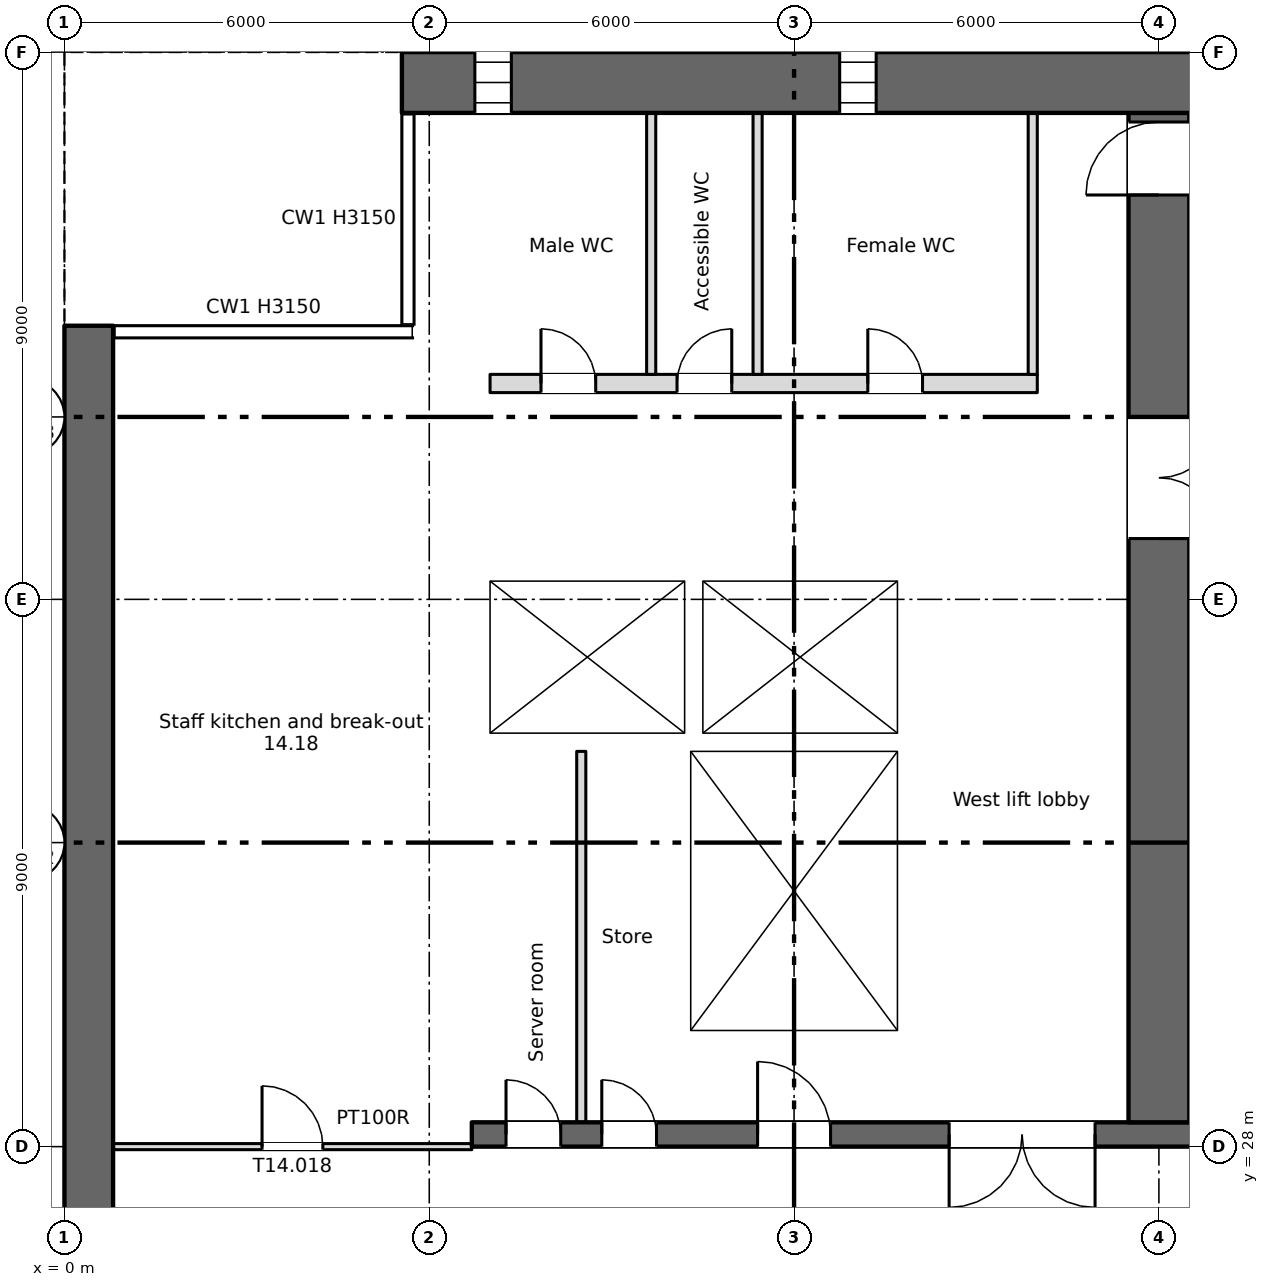
"""IFC4 building model, lengths in metres.
Left out: names, types, materials, properties, quantities, classifications, styles, units other than length and angle.
Written with IfcOpenShell. Run it as: python <this file> out.ifc"""

import sys

from ifc_helpers import new_model, si_unit, direction, frame, frame_2d, origin, place, context, subcontext, project, spatial, rectangle, extrude, element, fill, save


model = new_model("IFC4")
c1 = context("Model", 3, precision=1e-05, world=origin(), true_north=direction((0.0, 1.0)))
c2 = subcontext(c1, "Body", "Model", "MODEL_VIEW")
j1 = project(units=[si_unit("LENGTHUNIT", "METRE"), si_unit("PLANEANGLEUNIT", "RADIAN")], contexts=[c1])
p1 = place(None, origin())
s1 = spatial("IfcSite", under=j1, at=p1, CompositionType="ELEMENT")
p2 = place(p1, origin())
s2 = spatial("IfcBuilding", under=s1, at=p2, CompositionType="ELEMENT")
p3 = place(p2, frame((0.0, 0.0, 86.25)))
s3 = spatial("IfcBuildingStorey", under=s2, at=p3, CompositionType="ELEMENT", Elevation=86.25)
p4 = place(p3, frame((0.4, 4.5, 0.0), z_axis=(0.0, 0.0, 1.0), x_axis=(0.0, 1.0, 0.0)))
e1 = element("IfcWall", 1, at=p4, inside=s3, PredefinedType="SHEAR", context=c2, shape_type="SweptSolid", body=[
    extrude(rectangle(XDim=37.0, YDim=0.8, at=frame_2d((18.5, 0.0))), origin(), (0.0, 0.0, 1.0), 3.15),
])
p5 = place(p4, frame((1.2, 0.0, 0.6)))
e2 = element("IfcOpeningElement", 2, at=p5, cuts=e1, PredefinedType="OPENING", context=c2, shape_type="SweptSolid", body=[
    extrude(rectangle(XDim=0.6, YDim=2.4, at=frame_2d((0.3, 1.2))), frame((0.0, 0.41, 0.0), z_axis=(0.0, -1.0, 0.0), x_axis=(1.0, 0.0, 0.0)), (0.0, 0.0, 1.0), 0.82),
])
p6 = place(p4, frame((7.2, 0.0, 0.6)))
e3 = element("IfcOpeningElement", 3, at=p6, cuts=e1, PredefinedType="OPENING", context=c2, shape_type="SweptSolid", body=[
    extrude(rectangle(XDim=0.6, YDim=2.4, at=frame_2d((0.3, 1.2))), frame((0.0, 0.41, 0.0), z_axis=(0.0, -1.0, 0.0), x_axis=(1.0, 0.0, 0.0)), (0.0, 0.0, 1.0), 0.82),
])
p7 = place(p4, frame((13.2, 0.0, 0.6)))
e4 = element("IfcOpeningElement", 4, at=p7, cuts=e1, PredefinedType="OPENING", context=c2, shape_type="SweptSolid", body=[
    extrude(rectangle(XDim=0.6, YDim=2.4, at=frame_2d((0.3, 1.2))), frame((0.0, 0.41, 0.0), z_axis=(0.0, -1.0, 0.0), x_axis=(1.0, 0.0, 0.0)), (0.0, 0.0, 1.0), 0.82),
])
p8 = place(p4, frame((19.2, 0.0, 0.6)))
e5 = element("IfcOpeningElement", 5, at=p8, cuts=e1, PredefinedType="OPENING", context=c2, shape_type="SweptSolid", body=[
    extrude(rectangle(XDim=0.6, YDim=2.4, at=frame_2d((0.3, 1.2))), frame((0.0, 0.41, 0.0), z_axis=(0.0, -1.0, 0.0), x_axis=(1.0, 0.0, 0.0)), (0.0, 0.0, 1.0), 0.82),
])
p9 = place(p3, frame((5.55, 45.5, 0.0), z_axis=(0.0, 0.0, 1.0), x_axis=(1.0, 0.0, 0.0)))
e6 = element("IfcWall", 6, at=p9, inside=s3, PredefinedType="SHEAR", context=c2, shape_type="SweptSolid", body=[
    extrude(rectangle(XDim=66.9, YDim=1.0, at=frame_2d((33.45, 0.0))), origin(), (0.0, 0.0, 1.0), 3.15),
])
p10 = place(p9, frame((1.2, 0.0, 0.6)))
e7 = element("IfcOpeningElement", 7, at=p10, cuts=e6, PredefinedType="OPENING", context=c2, shape_type="SweptSolid", body=[
    extrude(rectangle(XDim=0.6, YDim=2.4, at=frame_2d((0.3, 1.2))), frame((0.0, 0.51, 0.0), z_axis=(0.0, -1.0, 0.0), x_axis=(1.0, 0.0, 0.0)), (0.0, 0.0, 1.0), 1.02),
])
p11 = place(p9, frame((7.2, 0.0, 0.6)))
e8 = element("IfcOpeningElement", 8, at=p11, cuts=e6, PredefinedType="OPENING", context=c2, shape_type="SweptSolid", body=[
    extrude(rectangle(XDim=0.6, YDim=2.4, at=frame_2d((0.3, 1.2))), frame((0.0, 0.51, 0.0), z_axis=(0.0, -1.0, 0.0), x_axis=(1.0, 0.0, 0.0)), (0.0, 0.0, 1.0), 1.02),
])
p12 = place(p9, frame((55.2, 0.0, 0.6)))
e9 = element("IfcOpeningElement", 9, at=p12, cuts=e6, PredefinedType="OPENING", context=c2, shape_type="SweptSolid", body=[
    extrude(rectangle(XDim=0.6, YDim=2.4, at=frame_2d((0.3, 1.2))), frame((0.0, 0.51, 0.0), z_axis=(0.0, -1.0, 0.0), x_axis=(1.0, 0.0, 0.0)), (0.0, 0.0, 1.0), 1.02),
])
p13 = place(p9, frame((61.2, 0.0, 0.6)))
e10 = element("IfcOpeningElement", 10, at=p13, cuts=e6, PredefinedType="OPENING", context=c2, shape_type="SweptSolid", body=[
    extrude(rectangle(XDim=0.6, YDim=2.4, at=frame_2d((0.3, 1.2))), frame((0.0, 0.51, 0.0), z_axis=(0.0, -1.0, 0.0), x_axis=(1.0, 0.0, 0.0)), (0.0, 0.0, 1.0), 1.02),
])
p14 = place(p3, frame((6.7, 28.2, 0.0), z_axis=(0.0, 0.0, 1.0), x_axis=(1.0, 0.0, 0.0)))
e11 = element("IfcWall", 11, at=p14, inside=s3, PredefinedType="SHEAR", context=c2, shape_type="SweptSolid", body=[
    extrude(rectangle(XDim=57.8, YDim=0.4, at=frame_2d((28.9, 0.0))), origin(), (0.0, 0.0, 1.0), 3.15),
])
p15 = place(p14, frame((12.812, 0.0, 0.0)))
e12 = element("IfcOpeningElement", 12, at=p15, cuts=e11, PredefinedType="OPENING", context=c2, shape_type="SweptSolid", body=[
    extrude(rectangle(XDim=0.9, YDim=2.1, at=frame_2d((0.45, 1.05))), frame((0.0, 0.21, 0.0), z_axis=(0.0, -1.0, 0.0), x_axis=(1.0, 0.0, 0.0)), (0.0, 0.0, 1.0), 0.42),
])
p16 = place(p14, frame((15.387, 0.0, 0.0)))
e13 = element("IfcOpeningElement", 13, at=p16, cuts=e11, PredefinedType="OPENING", context=c2, shape_type="SweptSolid", body=[
    extrude(rectangle(XDim=0.9, YDim=2.1, at=frame_2d((0.45, 1.05))), frame((0.0, 0.21, 0.0), z_axis=(0.0, -1.0, 0.0), x_axis=(1.0, 0.0, 0.0)), (0.0, 0.0, 1.0), 0.42),
])
p17 = place(p14, frame((48.312, 0.0, 0.0)))
e14 = element("IfcOpeningElement", 14, at=p17, cuts=e11, PredefinedType="OPENING", context=c2, shape_type="SweptSolid", body=[
    extrude(rectangle(XDim=0.9, YDim=2.1, at=frame_2d((0.45, 1.05))), frame((0.0, 0.21, 0.0), z_axis=(0.0, -1.0, 0.0), x_axis=(1.0, 0.0, 0.0)), (0.0, 0.0, 1.0), 0.42),
])
p18 = place(p14, frame((50.887, 0.0, 0.0)))
e15 = element("IfcOpeningElement", 15, at=p18, cuts=e11, PredefinedType="OPENING", context=c2, shape_type="SweptSolid", body=[
    extrude(rectangle(XDim=0.9, YDim=2.1, at=frame_2d((0.45, 1.05))), frame((0.0, 0.21, 0.0), z_axis=(0.0, -1.0, 0.0), x_axis=(1.0, 0.0, 0.0)), (0.0, 0.0, 1.0), 0.42),
])
p19 = place(p14, frame((0.562, 0.0, 0.0)))
e16 = element("IfcOpeningElement", 16, at=p19, cuts=e11, PredefinedType="OPENING", context=c2, shape_type="SweptSolid", body=[
    extrude(rectangle(XDim=0.9, YDim=2.1, at=frame_2d((0.45, 1.05))), frame((0.0, 0.21, 0.0), z_axis=(0.0, -1.0, 0.0), x_axis=(1.0, 0.0, 0.0)), (0.0, 0.0, 1.0), 0.42),
])
p20 = place(p14, frame((2.137, 0.0, 0.0)))
e17 = element("IfcOpeningElement", 17, at=p20, cuts=e11, PredefinedType="OPENING", context=c2, shape_type="SweptSolid", body=[
    extrude(rectangle(XDim=0.9, YDim=2.1, at=frame_2d((0.45, 1.05))), frame((0.0, 0.21, 0.0), z_axis=(0.0, -1.0, 0.0), x_axis=(1.0, 0.0, 0.0)), (0.0, 0.0, 1.0), 0.42),
])
p21 = place(p14, frame((4.7, 0.0, 0.0)))
e18 = element("IfcOpeningElement", 18, at=p21, cuts=e11, PredefinedType="OPENING", context=c2, shape_type="SweptSolid", body=[
    extrude(rectangle(XDim=1.2, YDim=2.1, at=frame_2d((0.6, 1.05))), frame((0.0, 0.21, 0.0), z_axis=(0.0, -1.0, 0.0), x_axis=(1.0, 0.0, 0.0)), (0.0, 0.0, 1.0), 0.42),
])
p22 = place(p14, frame((31.7, 0.0, 0.0)))
e19 = element("IfcOpeningElement", 19, at=p22, cuts=e11, PredefinedType="OPENING", context=c2, shape_type="SweptSolid", body=[
    extrude(rectangle(XDim=1.2, YDim=2.1, at=frame_2d((0.6, 1.05))), frame((0.0, 0.21, 0.0), z_axis=(0.0, -1.0, 0.0), x_axis=(1.0, 0.0, 0.0)), (0.0, 0.0, 1.0), 0.42),
])
p23 = place(p14, frame((55.2, 0.0, 0.0)))
e20 = element("IfcOpeningElement", 20, at=p23, cuts=e11, PredefinedType="OPENING", context=c2, shape_type="SweptSolid", body=[
    extrude(rectangle(XDim=1.2, YDim=2.1, at=frame_2d((0.6, 1.05))), frame((0.0, 0.21, 0.0), z_axis=(0.0, -1.0, 0.0), x_axis=(1.0, 0.0, 0.0)), (0.0, 0.0, 1.0), 0.42),
])
p24 = place(p14, frame((21.7, 0.0, 0.0)))
e21 = element("IfcOpeningElement", 21, at=p24, cuts=e11, PredefinedType="OPENING", context=c2, shape_type="SweptSolid", body=[
    extrude(rectangle(XDim=1.2, YDim=2.1, at=frame_2d((0.6, 1.05))), frame((0.0, 0.21, 0.0), z_axis=(0.0, -1.0, 0.0), x_axis=(1.0, 0.0, 0.0)), (0.0, 0.0, 1.0), 0.42),
])
p25 = place(p14, frame((41.7, 0.0, 0.0)))
e22 = element("IfcOpeningElement", 22, at=p25, cuts=e11, PredefinedType="OPENING", context=c2, shape_type="SweptSolid", body=[
    extrude(rectangle(XDim=1.2, YDim=2.1, at=frame_2d((0.6, 1.05))), frame((0.0, 0.21, 0.0), z_axis=(0.0, -1.0, 0.0), x_axis=(1.0, 0.0, 0.0)), (0.0, 0.0, 1.0), 0.42),
])
p26 = place(p14, frame((24.85, 0.0, 0.0)))
e23 = element("IfcOpeningElement", 23, at=p26, cuts=e11, PredefinedType="OPENING", context=c2, shape_type="SweptSolid", body=[
    extrude(rectangle(XDim=2.4, YDim=2.1, at=frame_2d((1.2, 1.05))), frame((0.0, 0.21, 0.0), z_axis=(0.0, -1.0, 0.0), x_axis=(1.0, 0.0, 0.0)), (0.0, 0.0, 1.0), 0.42),
])
p27 = place(p14, frame((37.35, 0.0, 0.0)))
e24 = element("IfcOpeningElement", 24, at=p27, cuts=e11, PredefinedType="OPENING", context=c2, shape_type="SweptSolid", body=[
    extrude(rectangle(XDim=2.4, YDim=2.1, at=frame_2d((1.2, 1.05))), frame((0.0, 0.21, 0.0), z_axis=(0.0, -1.0, 0.0), x_axis=(1.0, 0.0, 0.0)), (0.0, 0.0, 1.0), 0.42),
])
p28 = place(p14, frame((7.85, 0.0, 0.0)))
e25 = element("IfcOpeningElement", 25, at=p28, cuts=e11, PredefinedType="OPENING", context=c2, shape_type="SweptSolid", body=[
    extrude(rectangle(XDim=2.4, YDim=2.1, at=frame_2d((1.2, 1.05))), frame((0.0, 0.21, 0.0), z_axis=(0.0, -1.0, 0.0), x_axis=(1.0, 0.0, 0.0)), (0.0, 0.0, 1.0), 0.42),
])
p29 = place(p14, frame((28.85, 0.0, 0.0)))
e26 = element("IfcOpeningElement", 26, at=p29, cuts=e11, PredefinedType="OPENING", context=c2, shape_type="SweptSolid", body=[
    extrude(rectangle(XDim=0.9, YDim=2.1, at=frame_2d((0.45, 1.05))), frame((0.0, 0.21, 0.0), z_axis=(0.0, -1.0, 0.0), x_axis=(1.0, 0.0, 0.0)), (0.0, 0.0, 1.0), 0.42),
])
p30 = place(p14, frame((34.85, 0.0, 0.0)))
e27 = element("IfcOpeningElement", 27, at=p30, cuts=e11, PredefinedType="OPENING", context=c2, shape_type="SweptSolid", body=[
    extrude(rectangle(XDim=0.9, YDim=2.1, at=frame_2d((0.45, 1.05))), frame((0.0, 0.21, 0.0), z_axis=(0.0, -1.0, 0.0), x_axis=(1.0, 0.0, 0.0)), (0.0, 0.0, 1.0), 0.42),
])
p31 = place(p3, frame((6.85, 28.4, 0.0), z_axis=(0.0, 0.0, 1.0), x_axis=(0.0, 1.0, 0.0)))
e28 = element("IfcWall", 28, at=p31, inside=s3, PredefinedType="SHEAR", context=c2, shape_type="SweptSolid", body=[
    extrude(rectangle(XDim=16.6, YDim=0.3, at=frame_2d((8.3, 0.0))), origin(), (0.0, 0.0, 1.0), 3.15),
])
p32 = place(p3, frame((18.0, 28.4, 0.0), z_axis=(0.0, 0.0, 1.0), x_axis=(0.0, 1.0, 0.0)))
e29 = element("IfcWall", 29, at=p32, inside=s3, PredefinedType="SHEAR", context=c2, shape_type="SweptSolid", body=[
    extrude(rectangle(XDim=16.6, YDim=1.0, at=frame_2d((8.3, 0.0))), origin(), (0.0, 0.0, 1.0), 3.15),
])
p33 = place(p32, frame((9.6, 0.0, 0.0)))
e30 = element("IfcOpeningElement", 30, at=p33, cuts=e29, PredefinedType="OPENING", context=c2, shape_type="SweptSolid", body=[
    extrude(rectangle(XDim=2.0, YDim=2.1, at=frame_2d((1.0, 1.05))), frame((0.0, 0.51, 0.0), z_axis=(0.0, -1.0, 0.0), x_axis=(1.0, 0.0, 0.0)), (0.0, 0.0, 1.0), 1.02),
])
p34 = place(p32, frame((15.25, 0.0, 0.0)))
e31 = element("IfcOpeningElement", 31, at=p34, cuts=e29, PredefinedType="OPENING", context=c2, shape_type="SweptSolid", body=[
    extrude(rectangle(XDim=1.2, YDim=2.1, at=frame_2d((0.6, 1.05))), frame((0.0, 0.51, 0.0), z_axis=(0.0, -1.0, 0.0), x_axis=(1.0, 0.0, 0.0)), (0.0, 0.0, 1.0), 1.02),
])
for number, where, z_axis, x_axis in (
    (32, (10.15, 28.4, 0.0), (0.0, 0.0, 1.0), (0.0, 1.0, 0.0)),
    (33, (13.85, 28.4, 0.0), (0.0, 0.0, 1.0), (0.0, 1.0, 0.0)),
):
    element("IfcWall", number, at=place(p3, frame(where, z_axis=z_axis, x_axis=x_axis)), inside=s3, PredefinedType="SHEAR", context=c2, shape_type="SweptSolid", body=[
        extrude(rectangle(XDim=6.1, YDim=0.3, at=frame_2d((3.05, 0.0))), origin(), (0.0, 0.0, 1.0), 3.15),
    ])
for number, where, z_axis, x_axis in (
    (34, (7.0, 34.65, 0.0), (0.0, 0.0, 1.0), (1.0, 0.0, 0.0)),
    (35, (7.0, 37.45, 0.0), (0.0, 0.0, 1.0), (1.0, 0.0, 0.0)),
):
    element("IfcWall", number, at=place(p3, frame(where, z_axis=z_axis, x_axis=x_axis)), inside=s3, PredefinedType="SHEAR", context=c2, shape_type="SweptSolid", body=[
        extrude(rectangle(XDim=7.0, YDim=0.3, at=frame_2d((3.5, 0.0))), origin(), (0.0, 0.0, 1.0), 3.15),
    ])
p35 = place(p3, frame((13.85, 34.8, 0.0), z_axis=(0.0, 0.0, 1.0), x_axis=(0.0, 1.0, 0.0)))
e36 = element("IfcWall", 36, at=p35, inside=s3, PredefinedType="SHEAR", context=c2, shape_type="SweptSolid", body=[
    extrude(rectangle(XDim=2.5, YDim=0.3, at=frame_2d((1.25, 0.0))), origin(), (0.0, 0.0, 1.0), 3.15),
])
p36 = place(p3, frame((7.0, 40.55, 0.0), z_axis=(0.0, 0.0, 1.0), x_axis=(1.0, 0.0, 0.0)))
e37 = element("IfcWall", 37, at=p36, inside=s3, PredefinedType="PARTITIONING", context=c2, shape_type="SweptSolid", body=[
    extrude(rectangle(XDim=9.0, YDim=0.3, at=frame_2d((4.5, 0.0))), origin(), (0.0, 0.0, 1.0), 3.15),
])
p37 = place(p36, frame((0.837, 0.0, 0.0)))
e38 = element("IfcOpeningElement", 38, at=p37, cuts=e37, PredefinedType="OPENING", context=c2, shape_type="SweptSolid", body=[
    extrude(rectangle(XDim=0.9, YDim=2.1, at=frame_2d((0.45, 1.05))), frame((0.0, 0.16, 0.0), z_axis=(0.0, -1.0, 0.0), x_axis=(1.0, 0.0, 0.0)), (0.0, 0.0, 1.0), 0.32),
])
p38 = place(p36, frame((3.075, 0.0, 0.0)))
e39 = element("IfcOpeningElement", 39, at=p38, cuts=e37, PredefinedType="OPENING", context=c2, shape_type="SweptSolid", body=[
    extrude(rectangle(XDim=0.9, YDim=2.1, at=frame_2d((0.45, 1.05))), frame((0.0, 0.16, 0.0), z_axis=(0.0, -1.0, 0.0), x_axis=(1.0, 0.0, 0.0)), (0.0, 0.0, 1.0), 0.32),
])
p39 = place(p36, frame((6.212, 0.0, 0.0)))
e40 = element("IfcOpeningElement", 40, at=p39, cuts=e37, PredefinedType="OPENING", context=c2, shape_type="SweptSolid", body=[
    extrude(rectangle(XDim=0.9, YDim=2.1, at=frame_2d((0.45, 1.05))), frame((0.0, 0.16, 0.0), z_axis=(0.0, -1.0, 0.0), x_axis=(1.0, 0.0, 0.0)), (0.0, 0.0, 1.0), 0.32),
])
p40 = place(p3, frame((10.35, 34.8, 0.0), z_axis=(0.0, 0.0, 1.0), x_axis=(0.0, 1.0, 0.0)))
e41 = element("IfcWall", 41, at=p40, inside=s3, PredefinedType="SHEAR", context=c2, shape_type="SweptSolid", body=[
    extrude(rectangle(XDim=2.5, YDim=0.3, at=frame_2d((1.25, 0.0))), origin(), (0.0, 0.0, 1.0), 3.15),
])
p41 = place(p3, frame((15.925, 40.7, 0.0), z_axis=(0.0, 0.0, 1.0), x_axis=(0.0, 1.0, 0.0)))
e42 = element("IfcWall", 42, at=p41, inside=s3, PredefinedType="PARTITIONING", context=c2, shape_type="SweptSolid", body=[
    extrude(rectangle(XDim=4.3, YDim=0.15, at=frame_2d((2.15, 0.0))), origin(), (0.0, 0.0, 1.0), 3.15),
])
p42 = place(p3, frame((8.5, 28.4, 0.0), z_axis=(0.0, 0.0, 1.0), x_axis=(0.0, 1.0, 0.0)))
e43 = element("IfcWall", 43, at=p42, inside=s3, PredefinedType="PARTITIONING", context=c2, shape_type="SweptSolid", body=[
    extrude(rectangle(XDim=6.1, YDim=0.15, at=frame_2d((3.05, 0.0))), origin(), (0.0, 0.0, 1.0), 3.15),
])
for number, where, z_axis, x_axis in (
    (44, (9.65, 40.7, 0.0), (0.0, 0.0, 1.0), (0.0, 1.0, 0.0)),
    (45, (11.4, 40.7, 0.0), (0.0, 0.0, 1.0), (0.0, 1.0, 0.0)),
):
    element("IfcWall", number, at=place(p3, frame(where, z_axis=z_axis, x_axis=x_axis)), inside=s3, PredefinedType="PARTITIONING", context=c2, shape_type="SweptSolid", body=[
        extrude(rectangle(XDim=4.3, YDim=0.15, at=frame_2d((2.15, 0.0))), origin(), (0.0, 0.0, 1.0), 3.15),
    ])
p43 = place(p3, frame((0.8, 28.0, 0.0), z_axis=(0.0, 0.0, 1.0), x_axis=(1.0, 0.0, 0.0)))
e46 = element("IfcWall", 46, at=p43, inside=s3, PredefinedType="PARTITIONING", context=c2, shape_type="SweptSolid", body=[
    extrude(rectangle(XDim=5.9, YDim=0.1, at=frame_2d((2.95, 0.0))), origin(), (0.0, 0.0, 1.0), 3.15),
])
p44 = place(p43, frame((2.45, 0.0, 0.0)))
e47 = element("IfcOpeningElement", 47, at=p44, cuts=e46, PredefinedType="OPENING", context=c2, shape_type="SweptSolid", body=[
    extrude(rectangle(XDim=1.0, YDim=2.1, at=frame_2d((0.5, 1.05))), frame((0.0, 0.06, 0.0), z_axis=(0.0, -1.0, 0.0), x_axis=(1.0, 0.0, 0.0)), (0.0, 0.0, 1.0), 0.12),
])
p45 = place(p10, origin())
e48 = element("IfcWindow", 48, at=p45, inside=s3, PartitioningType="SINGLE_PANEL", PredefinedType="WINDOW", context=c2, shape_type="SweptSolid", body=[
    extrude(rectangle(XDim=0.6, YDim=2.4, at=frame_2d((0.3, 1.2))), frame((0.0, 0.03, 0.0), z_axis=(0.0, -1.0, 0.0), x_axis=(1.0, 0.0, 0.0)), (0.0, 0.0, 1.0), 0.06),
])
fill(e7, e48)
p46 = place(p11, origin())
e49 = element("IfcWindow", 49, at=p46, inside=s3, PartitioningType="SINGLE_PANEL", PredefinedType="WINDOW", context=c2, shape_type="SweptSolid", body=[
    extrude(rectangle(XDim=0.6, YDim=2.4, at=frame_2d((0.3, 1.2))), frame((0.0, 0.03, 0.0), z_axis=(0.0, -1.0, 0.0), x_axis=(1.0, 0.0, 0.0)), (0.0, 0.0, 1.0), 0.06),
])
fill(e8, e49)
p47 = place(p19, origin())
e50 = element("IfcDoor", 50, at=p47, inside=s3, OperationType="SINGLE_SWING_LEFT", PredefinedType="DOOR", context=c2, shape_type="SweptSolid", body=[
    extrude(rectangle(XDim=0.9, YDim=2.1, at=frame_2d((0.45, 1.05))), frame((0.0, 0.025, 0.0), z_axis=(0.0, -1.0, 0.0), x_axis=(1.0, 0.0, 0.0)), (0.0, 0.0, 1.0), 0.05),
])
fill(e16, e50)
p48 = place(p20, origin())
e51 = element("IfcDoor", 51, at=p48, inside=s3, OperationType="SINGLE_SWING_LEFT", PredefinedType="DOOR", context=c2, shape_type="SweptSolid", body=[
    extrude(rectangle(XDim=0.9, YDim=2.1, at=frame_2d((0.45, 1.05))), frame((0.0, 0.025, 0.0), z_axis=(0.0, -1.0, 0.0), x_axis=(1.0, 0.0, 0.0)), (0.0, 0.0, 1.0), 0.05),
])
fill(e17, e51)
p49 = place(p37, origin())
e52 = element("IfcDoor", 52, at=p49, inside=s3, OperationType="SINGLE_SWING_LEFT", PredefinedType="DOOR", context=c2, shape_type="SweptSolid", body=[
    extrude(rectangle(XDim=0.9, YDim=2.1, at=frame_2d((0.45, 1.05))), frame((0.0, 0.025, 0.0), z_axis=(0.0, -1.0, 0.0), x_axis=(1.0, 0.0, 0.0)), (0.0, 0.0, 1.0), 0.05),
])
fill(e38, e52)
p50 = place(p38, origin())
e53 = element("IfcDoor", 53, at=p50, inside=s3, OperationType="SINGLE_SWING_RIGHT", PredefinedType="DOOR", context=c2, shape_type="SweptSolid", body=[
    extrude(rectangle(XDim=0.9, YDim=2.1, at=frame_2d((0.45, 1.05))), frame((0.0, 0.025, 0.0), z_axis=(0.0, -1.0, 0.0), x_axis=(1.0, 0.0, 0.0)), (0.0, 0.0, 1.0), 0.05),
])
fill(e39, e53)
p51 = place(p39, origin())
e54 = element("IfcDoor", 54, at=p51, inside=s3, OperationType="SINGLE_SWING_LEFT", PredefinedType="DOOR", context=c2, shape_type="SweptSolid", body=[
    extrude(rectangle(XDim=0.9, YDim=2.1, at=frame_2d((0.45, 1.05))), frame((0.0, 0.025, 0.0), z_axis=(0.0, -1.0, 0.0), x_axis=(1.0, 0.0, 0.0)), (0.0, 0.0, 1.0), 0.05),
])
fill(e40, e54)
p52 = place(p21, origin())
e55 = element("IfcDoor", 55, at=p52, inside=s3, OperationType="SINGLE_SWING_LEFT", PredefinedType="DOOR", context=c2, shape_type="SweptSolid", body=[
    extrude(rectangle(XDim=1.2, YDim=2.1, at=frame_2d((0.6, 1.05))), frame((0.0, 0.025, 0.0), z_axis=(0.0, -1.0, 0.0), x_axis=(1.0, 0.0, 0.0)), (0.0, 0.0, 1.0), 0.05),
])
fill(e18, e55)
p53 = place(p28, origin())
e56 = element("IfcDoor", 56, at=p53, inside=s3, OperationType="DOUBLE_DOOR_SINGLE_SWING", PredefinedType="DOOR", context=c2, shape_type="SweptSolid", body=[
    extrude(rectangle(XDim=2.4, YDim=2.1, at=frame_2d((1.2, 1.05))), frame((0.0, 0.025, 0.0), z_axis=(0.0, -1.0, 0.0), x_axis=(1.0, 0.0, 0.0)), (0.0, 0.0, 1.0), 0.05),
])
fill(e25, e56)
p54 = place(p33, origin())
e57 = element("IfcDoor", 57, at=p54, inside=s3, OperationType="DOUBLE_DOOR_SINGLE_SWING", PredefinedType="DOOR", context=c2, shape_type="SweptSolid", body=[
    extrude(rectangle(XDim=2.0, YDim=2.1, at=frame_2d((1.0, 1.05))), frame((0.0, 0.025, 0.0), z_axis=(0.0, -1.0, 0.0), x_axis=(1.0, 0.0, 0.0)), (0.0, 0.0, 1.0), 0.05),
])
fill(e30, e57)
p55 = place(p34, origin())
e58 = element("IfcDoor", 58, at=p55, inside=s3, OperationType="SINGLE_SWING_LEFT", PredefinedType="DOOR", context=c2, shape_type="SweptSolid", body=[
    extrude(rectangle(XDim=1.2, YDim=2.1, at=frame_2d((0.6, 1.05))), frame((0.0, 0.025, 0.0), z_axis=(0.0, -1.0, 0.0), x_axis=(1.0, 0.0, 0.0)), (0.0, 0.0, 1.0), 0.05),
])
fill(e31, e58)
p56 = place(p44, origin())
e59 = element("IfcDoor", 59, at=p56, inside=s3, OperationType="SINGLE_SWING_LEFT", PredefinedType="DOOR", context=c2, shape_type="SweptSolid", body=[
    extrude(rectangle(XDim=1.0, YDim=2.1, at=frame_2d((0.5, 1.05))), frame((0.0, 0.025, 0.0), z_axis=(0.0, -1.0, 0.0), x_axis=(1.0, 0.0, 0.0)), (0.0, 0.0, 1.0), 0.05),
])
fill(e47, e59)
save(model, sys.argv[1])
